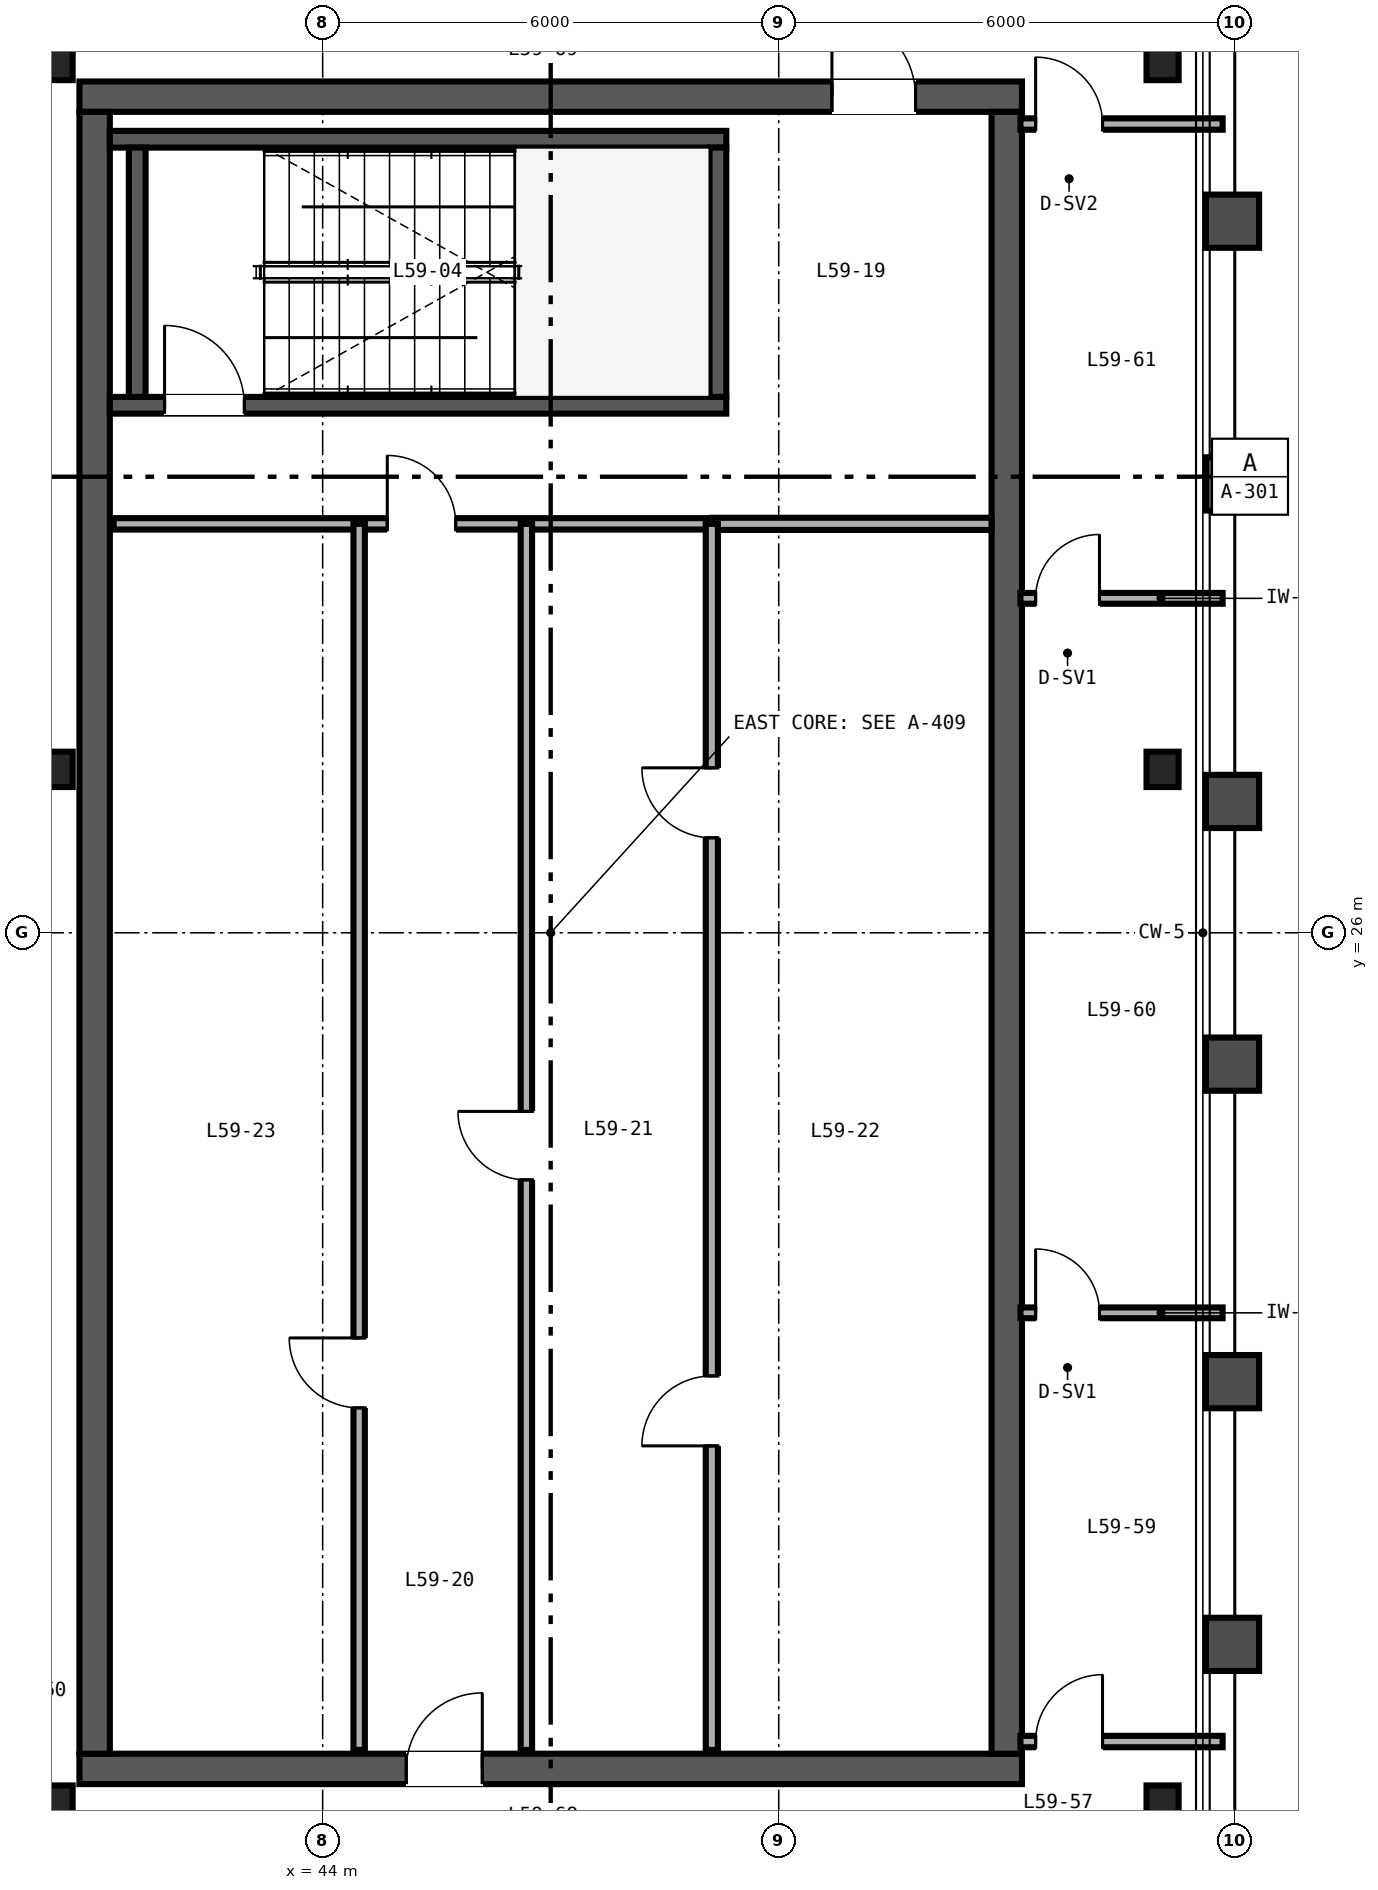
"""IFC4 building model, lengths in metres.
Left out: names, types, materials, properties, quantities, classifications, styles, units other than length and angle.
Written with IfcOpenShell. Run it as: python <this file> out.ifc"""

import sys

from ifc_helpers import new_model, si_unit, direction, frame, frame_2d, origin, origin_2d, place, context, subcontext, project, spatial, rectangle, i_section, extrude, source, transform, mapped, element, fill, save


model = new_model("IFC4")
c1 = context("Model", 3, precision=1e-05, world=origin(), true_north=direction((0.0, 1.0)))
c2 = subcontext(c1, "Body", "Model", "MODEL_VIEW")
j1 = project(units=[si_unit("LENGTHUNIT", "METRE"), si_unit("PLANEANGLEUNIT", "RADIAN")], contexts=[c1])
p1 = place(None, origin())
s1 = spatial("IfcSite", under=j1, at=p1, CompositionType="ELEMENT")
p2 = place(p1, origin())
s2 = spatial("IfcBuilding", under=s1, at=p2, CompositionType="ELEMENT")
p3 = place(p2, frame((0.0, 0.0, 236.4)))
s3 = spatial("IfcBuildingStorey", under=s2, at=p3, CompositionType="ELEMENT", Elevation=236.4)
p4 = place(p3, frame((40.8, 15.0, 0.0), z_axis=(0.0, 0.0, 1.0), x_axis=(1.0, 0.0, 0.0)))
e1 = element("IfcWall", 1, at=p4, inside=s3, PredefinedType="SHEAR", context=c2, shape_type="SweptSolid", body=[
    extrude(rectangle(XDim=12.4, YDim=0.4, at=frame_2d((6.2, 0.0))), origin(), (0.0, 0.0, 1.0), 3.38),
])
p5 = place(p4, frame((4.3, 0.0, 0.0)))
e2 = element("IfcOpeningElement", 2, at=p5, cuts=e1, PredefinedType="OPENING", context=c2, shape_type="SweptSolid", body=[
    extrude(rectangle(XDim=1.0, YDim=2.15, at=frame_2d((0.5, 1.075))), frame((0.0, 0.21, 0.0), z_axis=(0.0, -1.0, 0.0), x_axis=(1.0, 0.0, 0.0)), (0.0, 0.0, 1.0), 0.42),
])
p6 = place(p3, frame((40.8, 37.0, 0.0), z_axis=(0.0, 0.0, 1.0), x_axis=(1.0, 0.0, 0.0)))
e3 = element("IfcWall", 3, at=p6, inside=s3, PredefinedType="SHEAR", context=c2, shape_type="SweptSolid", body=[
    extrude(rectangle(XDim=12.4, YDim=0.4, at=frame_2d((6.2, 0.0))), origin(), (0.0, 0.0, 1.0), 3.38),
])
p7 = place(p6, frame((9.9, 0.0, 0.0)))
e4 = element("IfcOpeningElement", 4, at=p7, cuts=e3, PredefinedType="OPENING", context=c2, shape_type="SweptSolid", body=[
    extrude(rectangle(XDim=1.1, YDim=2.15, at=frame_2d((0.55, 1.075))), frame((0.0, 0.21, 0.0), z_axis=(0.0, -1.0, 0.0), x_axis=(1.0, 0.0, 0.0)), (0.0, 0.0, 1.0), 0.42),
])
for number, where, z_axis, x_axis in (
    (5, (41.0, 15.2, 0.0), (0.0, 0.0, 1.0), (0.0, 1.0, 0.0)),
    (6, (53.0, 15.2, 0.0), (0.0, 0.0, 1.0), (0.0, 1.0, 0.0)),
):
    element("IfcWall", number, at=place(p3, frame(where, z_axis=z_axis, x_axis=x_axis)), inside=s3, PredefinedType="SHEAR", context=c2, shape_type="SweptSolid", body=[
        extrude(rectangle(XDim=21.6, YDim=0.4, at=frame_2d((10.8, 0.0))), origin(), (0.0, 0.0, 1.0), 3.38),
    ])
p8 = place(p3, frame((41.2, 32.94, 0.0), z_axis=(0.0, 0.0, 1.0), x_axis=(1.0, 0.0, 0.0)))
e7 = element("IfcWall", 7, at=p8, inside=s3, PredefinedType="SHEAR", context=c2, shape_type="SweptSolid", body=[
    extrude(rectangle(XDim=8.11, YDim=0.22, at=frame_2d((4.055, 0.0))), origin(), (0.0, 0.0, 1.0), 3.4),
])
p9 = place(p8, frame((0.72, 0.0, 0.0)))
e8 = element("IfcOpeningElement", 8, at=p9, cuts=e7, PredefinedType="OPENING", context=c2, shape_type="SweptSolid", body=[
    extrude(rectangle(XDim=1.05, YDim=2.15, at=frame_2d((0.525, 1.075))), frame((0.0, 0.12, 0.0), z_axis=(0.0, -1.0, 0.0), x_axis=(1.0, 0.0, 0.0)), (0.0, 0.0, 1.0), 0.24),
])
p10 = place(p3, frame((41.2, 36.44, 0.0), z_axis=(0.0, 0.0, 1.0), x_axis=(1.0, 0.0, 0.0)))
e9 = element("IfcWall", 9, at=p10, inside=s3, PredefinedType="SHEAR", context=c2, shape_type="SweptSolid", body=[
    extrude(rectangle(XDim=8.11, YDim=0.22, at=frame_2d((4.055, 0.0))), origin(), (0.0, 0.0, 1.0), 3.4),
])
for number, where, z_axis, x_axis in (
    (10, (41.56, 33.05, 0.0), (0.0, 0.0, 1.0), (0.0, 1.0, 0.0)),
    (11, (49.2, 33.05, 0.0), (0.0, 0.0, 1.0), (0.0, 1.0, 0.0)),
):
    element("IfcWall", number, at=place(p3, frame(where, z_axis=z_axis, x_axis=x_axis)), inside=s3, PredefinedType="SHEAR", context=c2, shape_type="SweptSolid", body=[
        extrude(rectangle(XDim=3.28, YDim=0.22, at=frame_2d((1.64, 0.0))), origin(), (0.0, 0.0, 1.0), 3.4),
    ])
m1 = source(origin(), c2, "Body", "SweptSolid", [
    extrude(i_section(OverallWidth=0.422, OverallDepth=0.465, WebThickness=0.045, FlangeThickness=0.073, FilletRadius=0.025, at=origin_2d()), origin(), (0.0, 0.0, 1.0), 3.38),
])
for number, where, z_axis, x_axis in (
    (12, (40.5, 14.55, 0.0), (0.0, 0.0, 1.0), (1.0, 0.0, 0.0)),
    (13, (55.05, 14.55, 0.0), (0.0, 0.0, 1.0), (1.0, 0.0, 0.0)),
    (14, (40.5, 28.15, 0.0), (0.0, 0.0, 1.0), (1.0, 0.0, 0.0)),
    (15, (55.05, 28.15, 0.0), (0.0, 0.0, 1.0), (1.0, 0.0, 0.0)),
    (16, (40.5, 37.45, 0.0), (0.0, 0.0, 1.0), (1.0, 0.0, 0.0)),
    (17, (55.05, 37.45, 0.0), (0.0, 0.0, 1.0), (1.0, 0.0, 0.0)),
):
    element("IfcColumn", number, at=place(p3, frame(where, z_axis=z_axis, x_axis=x_axis)), inside=s3, PredefinedType="COLUMN", context=c2, shape_type="MappedRepresentation", body=[
        mapped(m1, transform((0.0, 0.0, 0.0), scale=1.0)),
    ])
p11 = place(p3, frame((41.25, 31.38, 0.0), z_axis=(0.0, 0.0, 1.0), x_axis=(1.0, 0.0, 0.0)))
e18 = element("IfcWall", 18, at=p11, inside=s3, PredefinedType="PARTITIONING", context=c2, shape_type="SweptSolid", body=[
    extrude(rectangle(XDim=7.87, YDim=0.15, at=frame_2d((3.935, 0.0))), origin(), (0.0, 0.0, 1.0), 2.48),
])
p12 = place(p11, frame((3.6, 0.0, 0.0)))
e19 = element("IfcOpeningElement", 19, at=p12, cuts=e18, PredefinedType="OPENING", context=c2, shape_type="SweptSolid", body=[
    extrude(rectangle(XDim=0.9, YDim=2.15, at=frame_2d((0.45, 1.075))), frame((0.0, 0.085, 0.0), z_axis=(0.0, -1.0, 0.0), x_axis=(1.0, 0.0, 0.0)), (0.0, 0.0, 1.0), 0.17),
])
p13 = place(p3, frame((46.68, 15.25, 0.0), z_axis=(0.0, 0.0, 1.0), x_axis=(0.0, 1.0, 0.0)))
e20 = element("IfcWall", 20, at=p13, inside=s3, PredefinedType="PARTITIONING", context=c2, shape_type="SweptSolid", body=[
    extrude(rectangle(XDim=16.13, YDim=0.15, at=frame_2d((8.065, 0.0))), origin(), (0.0, 0.0, 1.0), 2.453),
])
p14 = place(p13, frame((7.5, 0.0, 0.0)))
e21 = element("IfcOpeningElement", 21, at=p14, cuts=e20, PredefinedType="OPENING", context=c2, shape_type="SweptSolid", body=[
    extrude(rectangle(XDim=0.9, YDim=2.15, at=frame_2d((0.45, 1.075))), frame((0.0, 0.085, 0.0), z_axis=(0.0, -1.0, 0.0), x_axis=(1.0, 0.0, 0.0)), (0.0, 0.0, 1.0), 0.17),
])
p15 = place(p3, frame((49.12, 31.38, 0.0), z_axis=(0.0, 0.0, 1.0), x_axis=(1.0, 0.0, 0.0)))
e22 = element("IfcWall", 22, at=p15, inside=s3, PredefinedType="PARTITIONING", context=c2, shape_type="SweptSolid", body=[
    extrude(rectangle(XDim=3.68, YDim=0.16, at=frame_2d((1.84, 0.0))), origin(), (0.0, 0.0, 1.0), 2.48),
])
p16 = place(p3, frame((49.12, 15.25, 0.0), z_axis=(0.0, 0.0, 1.0), x_axis=(0.0, 1.0, 0.0)))
e23 = element("IfcWall", 23, at=p16, inside=s3, PredefinedType="PARTITIONING", context=c2, shape_type="SweptSolid", body=[
    extrude(rectangle(XDim=16.13, YDim=0.16, at=frame_2d((8.065, 0.0))), origin(), (0.0, 0.0, 1.0), 2.453),
])
p17 = place(p16, frame((4.0, 0.0, 0.0)))
e24 = element("IfcOpeningElement", 24, at=p17, cuts=e23, PredefinedType="OPENING", context=c2, shape_type="SweptSolid", body=[
    extrude(rectangle(XDim=0.92, YDim=2.15, at=frame_2d((0.46, 1.075))), frame((0.0, 0.09, 0.0), z_axis=(0.0, -1.0, 0.0), x_axis=(1.0, 0.0, 0.0)), (0.0, 0.0, 1.0), 0.18),
])
p18 = place(p16, frame((12.0, 0.0, 0.0)))
e25 = element("IfcOpeningElement", 25, at=p18, cuts=e23, PredefinedType="OPENING", context=c2, shape_type="SweptSolid", body=[
    extrude(rectangle(XDim=0.92, YDim=2.15, at=frame_2d((0.46, 1.075))), frame((0.0, 0.09, 0.0), z_axis=(0.0, -1.0, 0.0), x_axis=(1.0, 0.0, 0.0)), (0.0, 0.0, 1.0), 0.18),
])
p19 = place(p3, frame((44.48, 15.25, 0.0), z_axis=(0.0, 0.0, 1.0), x_axis=(0.0, 1.0, 0.0)))
e26 = element("IfcWall", 26, at=p19, inside=s3, PredefinedType="PARTITIONING", context=c2, shape_type="SweptSolid", body=[
    extrude(rectangle(XDim=16.13, YDim=0.15, at=frame_2d((8.065, 0.0))), origin(), (0.0, 0.0, 1.0), 2.453),
])
p20 = place(p19, frame((4.5, 0.0, 0.0)))
e27 = element("IfcOpeningElement", 27, at=p20, cuts=e26, PredefinedType="OPENING", context=c2, shape_type="SweptSolid", body=[
    extrude(rectangle(XDim=0.92, YDim=2.15, at=frame_2d((0.46, 1.075))), frame((0.0, 0.085, 0.0), z_axis=(0.0, -1.0, 0.0), x_axis=(1.0, 0.0, 0.0)), (0.0, 0.0, 1.0), 0.17),
])
p21 = place(p3, frame((53.18, 15.36, 0.0), z_axis=(0.0, 0.0, 1.0), x_axis=(1.0, 0.0, 0.0)))
e28 = element("IfcWall", 28, at=p21, inside=s3, PredefinedType="PARTITIONING", context=c2, shape_type="SweptSolid", body=[
    extrude(rectangle(XDim=2.66, YDim=0.15, at=frame_2d((1.33, 0.0))), origin(), (0.0, 0.0, 1.0), 2.601),
])
p22 = place(p21, frame((0.2, 0.0, 0.0)))
e29 = element("IfcOpeningElement", 29, at=p22, cuts=e28, PredefinedType="OPENING", context=c2, shape_type="SweptSolid", body=[
    extrude(rectangle(XDim=0.88, YDim=2.15, at=frame_2d((0.44, 1.075))), frame((0.0, 0.085, 0.0), z_axis=(0.0, -1.0, 0.0), x_axis=(1.0, 0.0, 0.0)), (0.0, 0.0, 1.0), 0.17),
])
p23 = place(p3, frame((53.18, 36.64, 0.0), z_axis=(0.0, 0.0, 1.0), x_axis=(1.0, 0.0, 0.0)))
e30 = element("IfcWall", 30, at=p23, inside=s3, PredefinedType="PARTITIONING", context=c2, shape_type="SweptSolid", body=[
    extrude(rectangle(XDim=2.66, YDim=0.15, at=frame_2d((1.33, 0.0))), origin(), (0.0, 0.0, 1.0), 2.763),
])
p24 = place(p23, frame((0.2, 0.0, 0.0)))
e31 = element("IfcOpeningElement", 31, at=p24, cuts=e30, PredefinedType="OPENING", context=c2, shape_type="SweptSolid", body=[
    extrude(rectangle(XDim=0.88, YDim=2.15, at=frame_2d((0.44, 1.075))), frame((0.0, 0.085, 0.0), z_axis=(0.0, -1.0, 0.0), x_axis=(1.0, 0.0, 0.0)), (0.0, 0.0, 1.0), 0.17),
])
p25 = place(p3, frame((53.18, 21.0, 0.0), z_axis=(0.0, 0.0, 1.0), x_axis=(1.0, 0.0, 0.0)))
e32 = element("IfcWall", 32, at=p25, inside=s3, PredefinedType="PARTITIONING", context=c2, shape_type="SweptSolid", body=[
    extrude(rectangle(XDim=2.66, YDim=0.142, at=frame_2d((1.33, 0.0))), origin(), (0.0, 0.0, 1.0), 2.601),
])
p26 = place(p25, frame((0.2, 0.0, 0.0)))
e33 = element("IfcOpeningElement", 33, at=p26, cuts=e32, PredefinedType="OPENING", context=c2, shape_type="SweptSolid", body=[
    extrude(rectangle(XDim=0.84, YDim=2.1, at=frame_2d((0.42, 1.05))), frame((0.0, 0.081, 0.0), z_axis=(0.0, -1.0, 0.0), x_axis=(1.0, 0.0, 0.0)), (0.0, 0.0, 1.0), 0.162),
])
p27 = place(p3, frame((53.18, 30.4, 0.0), z_axis=(0.0, 0.0, 1.0), x_axis=(1.0, 0.0, 0.0)))
e34 = element("IfcWall", 34, at=p27, inside=s3, PredefinedType="PARTITIONING", context=c2, shape_type="SweptSolid", body=[
    extrude(rectangle(XDim=2.66, YDim=0.142, at=frame_2d((1.33, 0.0))), origin(), (0.0, 0.0, 1.0), 2.763),
])
p28 = place(p27, frame((0.2, 0.0, 0.0)))
e35 = element("IfcOpeningElement", 35, at=p28, cuts=e34, PredefinedType="OPENING", context=c2, shape_type="SweptSolid", body=[
    extrude(rectangle(XDim=0.84, YDim=2.1, at=frame_2d((0.42, 1.05))), frame((0.0, 0.081, 0.0), z_axis=(0.0, -1.0, 0.0), x_axis=(1.0, 0.0, 0.0)), (0.0, 0.0, 1.0), 0.162),
])
m2 = source(origin(), c2, "Body", "SweptSolid", [
    extrude(rectangle(XDim=1.05, YDim=2.15, at=frame_2d((0.525, 1.075))), frame((0.0, 0.025, 0.0), z_axis=(0.0, -1.0, 0.0), x_axis=(1.0, 0.0, 0.0)), (0.0, 0.0, 1.0), 0.05),
])
p29 = place(p9, origin())
e36 = element("IfcDoor", 36, at=p29, inside=s3, OperationType="SINGLE_SWING_LEFT", PredefinedType="DOOR", context=c2, shape_type="MappedRepresentation", body=[
    mapped(m2, transform((0.0, 0.0, 0.0), scale=1.0)),
])
fill(e8, e36)
m3 = source(origin(), c2, "Body", "SweptSolid", [
    extrude(rectangle(XDim=0.9, YDim=2.15, at=frame_2d((0.45, 1.075))), frame((0.0, 0.025, 0.0), z_axis=(0.0, -1.0, 0.0), x_axis=(1.0, 0.0, 0.0)), (0.0, 0.0, 1.0), 0.05),
])
p30 = place(p14, origin())
e37 = element("IfcDoor", 37, at=p30, inside=s3, OperationType="SINGLE_SWING_RIGHT", PredefinedType="DOOR", context=c2, shape_type="MappedRepresentation", body=[
    mapped(m3, transform((0.0, 0.0, 0.0), scale=1.0)),
])
fill(e21, e37)
p31 = place(p12, origin())
e38 = element("IfcDoor", 38, at=p31, inside=s3, OperationType="SINGLE_SWING_LEFT", PredefinedType="DOOR", context=c2, shape_type="MappedRepresentation", body=[
    mapped(m3, transform((0.0, 0.0, 0.0), scale=1.0)),
])
fill(e19, e38)
m4 = source(origin(), c2, "Body", "SweptSolid", [
    extrude(rectangle(XDim=1.0, YDim=2.15, at=frame_2d((0.5, 1.075))), frame((0.0, 0.025, 0.0), z_axis=(0.0, -1.0, 0.0), x_axis=(1.0, 0.0, 0.0)), (0.0, 0.0, 1.0), 0.05),
])
p32 = place(p5, origin())
e39 = element("IfcDoor", 39, at=p32, inside=s3, OperationType="SINGLE_SWING_RIGHT", PredefinedType="DOOR", context=c2, shape_type="MappedRepresentation", body=[
    mapped(m4, transform((0.0, 0.0, 0.0), scale=1.0)),
])
fill(e2, e39)
m5 = source(origin(), c2, "Body", "SweptSolid", [
    extrude(rectangle(XDim=1.1, YDim=2.15, at=frame_2d((0.55, 1.075))), frame((0.0, 0.025, 0.0), z_axis=(0.0, -1.0, 0.0), x_axis=(1.0, 0.0, 0.0)), (0.0, 0.0, 1.0), 0.05),
])
p33 = place(p7, origin())
e40 = element("IfcDoor", 40, at=p33, inside=s3, OperationType="SINGLE_SWING_LEFT", PredefinedType="DOOR", context=c2, shape_type="MappedRepresentation", body=[
    mapped(m5, transform((0.0, 0.0, 0.0), scale=1.0)),
])
fill(e4, e40)
m6 = source(origin(), c2, "Body", "SweptSolid", [
    extrude(rectangle(XDim=0.92, YDim=2.15, at=frame_2d((0.46, 1.075))), frame((0.0, 0.025, 0.0), z_axis=(0.0, -1.0, 0.0), x_axis=(1.0, 0.0, 0.0)), (0.0, 0.0, 1.0), 0.05),
])
p34 = place(p17, origin())
e41 = element("IfcDoor", 41, at=p34, inside=s3, OperationType="SINGLE_SWING_LEFT", PredefinedType="DOOR", context=c2, shape_type="MappedRepresentation", body=[
    mapped(m6, transform((0.0, 0.0, 0.0), scale=1.0)),
])
fill(e24, e41)
p35 = place(p18, origin())
e42 = element("IfcDoor", 42, at=p35, inside=s3, OperationType="SINGLE_SWING_RIGHT", PredefinedType="DOOR", context=c2, shape_type="MappedRepresentation", body=[
    mapped(m6, transform((0.0, 0.0, 0.0), scale=1.0)),
])
fill(e25, e42)
p36 = place(p20, origin())
e43 = element("IfcDoor", 43, at=p36, inside=s3, OperationType="SINGLE_SWING_RIGHT", PredefinedType="DOOR", context=c2, shape_type="MappedRepresentation", body=[
    mapped(m6, transform((0.0, 0.0, 0.0), scale=1.0)),
])
fill(e27, e43)
m7 = source(origin(), c2, "Body", "SweptSolid", [
    extrude(rectangle(XDim=0.88, YDim=2.15, at=frame_2d((0.44, 1.075))), frame((0.0, 0.025, 0.0), z_axis=(0.0, -1.0, 0.0), x_axis=(1.0, 0.0, 0.0)), (0.0, 0.0, 1.0), 0.05),
])
p37 = place(p22, origin())
e44 = element("IfcDoor", 44, at=p37, inside=s3, OperationType="SINGLE_SWING_RIGHT", PredefinedType="DOOR", context=c2, shape_type="MappedRepresentation", body=[
    mapped(m7, transform((0.0, 0.0, 0.0), scale=1.0)),
])
fill(e29, e44)
p38 = place(p24, origin())
e45 = element("IfcDoor", 45, at=p38, inside=s3, OperationType="SINGLE_SWING_LEFT", PredefinedType="DOOR", context=c2, shape_type="MappedRepresentation", body=[
    mapped(m7, transform((0.0, 0.0, 0.0), scale=1.0)),
])
fill(e31, e45)
m8 = source(origin(), c2, "Body", "SweptSolid", [
    extrude(rectangle(XDim=0.84, YDim=2.1, at=frame_2d((0.42, 1.05))), frame((0.0, 0.025, 0.0), z_axis=(0.0, -1.0, 0.0), x_axis=(1.0, 0.0, 0.0)), (0.0, 0.0, 1.0), 0.05),
])
p39 = place(p26, origin())
e46 = element("IfcDoor", 46, at=p39, inside=s3, OperationType="SINGLE_SWING_LEFT", PredefinedType="DOOR", context=c2, shape_type="MappedRepresentation", body=[
    mapped(m8, transform((0.0, 0.0, 0.0), scale=1.0)),
])
fill(e33, e46)
p40 = place(p28, origin())
e47 = element("IfcDoor", 47, at=p40, inside=s3, OperationType="SINGLE_SWING_RIGHT", PredefinedType="DOOR", context=c2, shape_type="MappedRepresentation", body=[
    mapped(m8, transform((0.0, 0.0, 0.0), scale=1.0)),
])
fill(e35, e47)
save(model, sys.argv[1])
